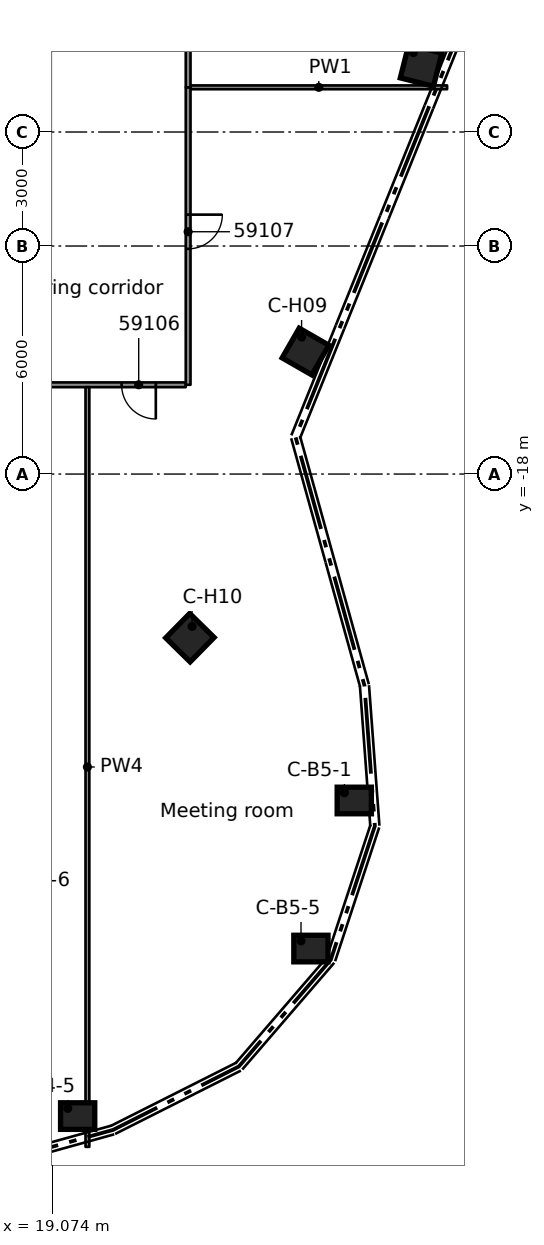
"""IFC4 building model, lengths in metres.
Left out: names, types, materials, properties, quantities, classifications, styles, units other than length and angle.
Written with IfcOpenShell. Run it as: python <this file> out.ifc"""

import sys

from ifc_helpers import new_model, si_unit, direction, frame, frame_2d, origin, origin_2d, place, context, subcontext, project, spatial, rectangle, extrude, element, fill, save


model = new_model("IFC4")
c1 = context("Model", 3, precision=1e-05, world=origin(), true_north=direction((0.0, 1.0)))
c2 = subcontext(c1, "Body", "Model", "MODEL_VIEW")
j1 = project(units=[si_unit("LENGTHUNIT", "METRE"), si_unit("PLANEANGLEUNIT", "RADIAN")], contexts=[c1])
p1 = place(None, origin())
s1 = spatial("IfcSite", under=j1, at=p1, CompositionType="ELEMENT")
p2 = place(p1, origin())
s2 = spatial("IfcBuilding", under=s1, at=p2, CompositionType="ELEMENT")
p3 = place(p2, frame((0.0, 0.0, 289.4)))
s3 = spatial("IfcBuildingStorey", under=s2, at=p3, CompositionType="ELEMENT", Elevation=289.4)
for number, where, z_axis, x_axis in (
    (1, (19.743, -34.893, 0.0), (0.0, 0.0, 1.0), (1.0, 0.0, 0.0)),
    (2, (27.022, -26.589, 0.0), (0.0, 0.0, 1.0), (1.0, 0.0, 0.0)),
    (3, (25.881, -30.485, 0.0), (0.0, 0.0, 1.0), (1.0, 0.0, 0.0)),
):
    element("IfcColumn", number, at=place(p3, frame(where, z_axis=z_axis, x_axis=x_axis)), inside=s3, PredefinedType="COLUMN", context=c2, shape_type="SweptSolid", body=[
        extrude(rectangle(XDim=0.9, YDim=0.7, at=origin_2d()), origin(), (0.0, 0.0, 1.0), 3.5),
    ])
for number, where, z_axis, x_axis in (
    (4, (28.78, -7.25, 0.0), (0.0, 0.0, 1.0), (0.97, -0.244, 0.0)),
    (5, (25.739, -14.777, 0.0), (0.0, 0.0, 1.0), (0.867, -0.498, 0.0)),
    (6, (22.697, -22.305, 0.0), (0.0, 0.0, 1.0), (0.713, -0.701, 0.0)),
):
    element("IfcColumn", number, at=place(p3, frame(where, z_axis=z_axis, x_axis=x_axis)), inside=s3, PredefinedType="COLUMN", context=c2, shape_type="SweptSolid", body=[
        extrude(rectangle(XDim=0.9, YDim=0.9, at=origin_2d()), origin(), (0.0, 0.0, 1.0), 3.5),
    ])
p4 = place(p3, frame((22.587, -15.651, 0.0), z_axis=(0.0, 0.0, 1.0), x_axis=(-1.0, 0.0, 0.0)))
e7 = element("IfcWall", 7, at=p4, inside=s3, PredefinedType="PARTITIONING", context=c2, shape_type="SweptSolid", body=[
    extrude(rectangle(XDim=10.996, YDim=0.125, at=frame_2d((5.498, 0.0))), origin(), (0.0, 0.0, 1.0), 3.15),
])
p5 = place(p4, frame((6.438, 0.0, 0.0)))
e8 = element("IfcOpeningElement", 8, at=p5, cuts=e7, PredefinedType="OPENING", context=c2, shape_type="SweptSolid", body=[
    extrude(rectangle(XDim=0.9, YDim=2.1, at=frame_2d((0.45, 1.05))), frame((0.0, 0.073, 0.0), z_axis=(0.0, -1.0, 0.0), x_axis=(1.0, 0.0, 0.0)), (0.0, 0.0, 1.0), 0.145),
])
p6 = place(p4, frame((0.788, 0.0, 0.0)))
e9 = element("IfcOpeningElement", 9, at=p6, cuts=e7, PredefinedType="OPENING", context=c2, shape_type="SweptSolid", body=[
    extrude(rectangle(XDim=0.9, YDim=2.1, at=frame_2d((0.45, 1.05))), frame((0.0, 0.073, 0.0), z_axis=(0.0, -1.0, 0.0), x_axis=(1.0, 0.0, 0.0)), (0.0, 0.0, 1.0), 0.145),
])
p7 = place(p3, frame((22.712, -7.824, 0.0), z_axis=(0.0, 0.0, 1.0), x_axis=(1.0, 0.0, 0.0)))
e10 = element("IfcWall", 10, at=p7, inside=s3, PredefinedType="PARTITIONING", context=c2, shape_type="SweptSolid", body=[
    extrude(rectangle(XDim=6.753, YDim=0.1, at=frame_2d((3.376, 0.0))), origin(), (0.0, 0.0, 1.0), 3.15),
])
p8 = place(p3, frame((22.65, -7.824, 0.0), z_axis=(0.0, 0.0, 1.0), x_axis=(0.0, -1.0, 0.0)))
e11 = element("IfcWall", 11, at=p8, inside=s3, PredefinedType="PARTITIONING", context=c2, shape_type="SweptSolid", body=[
    extrude(rectangle(XDim=7.827, YDim=0.125, at=frame_2d((3.914, 0.0))), origin(), (0.0, 0.0, 1.0), 3.15),
])
p9 = place(p8, frame((3.35, 0.0, 0.0)))
e12 = element("IfcOpeningElement", 12, at=p9, cuts=e11, PredefinedType="OPENING", context=c2, shape_type="SweptSolid", body=[
    extrude(rectangle(XDim=0.9, YDim=2.1, at=frame_2d((0.45, 1.05))), frame((0.0, 0.073, 0.0), z_axis=(0.0, -1.0, 0.0), x_axis=(1.0, 0.0, 0.0)), (0.0, 0.0, 1.0), 0.145),
])
p10 = place(p3, frame((22.65, 15.651, 0.0), z_axis=(0.0, 0.0, 1.0), x_axis=(0.0, -1.0, 0.0)))
e13 = element("IfcWall", 13, at=p10, inside=s3, PredefinedType="PARTITIONING", context=c2, shape_type="SweptSolid", body=[
    extrude(rectangle(XDim=23.475, YDim=0.125, at=frame_2d((11.737, 0.0))), origin(), (0.0, 0.0, 1.0), 3.15),
])
p11 = place(p10, frame((19.001, 0.0, 0.0)))
e14 = element("IfcOpeningElement", 14, at=p11, cuts=e13, PredefinedType="OPENING", context=c2, shape_type="SweptSolid", body=[
    extrude(rectangle(XDim=0.9, YDim=2.1, at=frame_2d((0.45, 1.05))), frame((0.0, 0.073, 0.0), z_axis=(0.0, -1.0, 0.0), x_axis=(1.0, 0.0, 0.0)), (0.0, 0.0, 1.0), 0.145),
])
p12 = place(p10, frame((11.177, 0.0, 0.0)))
e15 = element("IfcOpeningElement", 15, at=p12, cuts=e13, PredefinedType="OPENING", context=c2, shape_type="SweptSolid", body=[
    extrude(rectangle(XDim=0.9, YDim=2.1, at=frame_2d((0.45, 1.05))), frame((0.0, 0.073, 0.0), z_axis=(0.0, -1.0, 0.0), x_axis=(1.0, 0.0, 0.0)), (0.0, 0.0, 1.0), 0.145),
])
p13 = place(p3, frame((20.0, -35.703, 0.0), z_axis=(0.0, 0.0, 1.0), x_axis=(0.0, 1.0, 0.0)))
e16 = element("IfcWall", 16, at=p13, inside=s3, PredefinedType="PARTITIONING", context=c2, shape_type="SweptSolid", body=[
    extrude(rectangle(XDim=19.99, YDim=0.1, at=frame_2d((9.995, 0.0))), origin(), (0.0, 0.0, 1.0), 2.495),
])
p14 = place(p6, origin())
e17 = element("IfcDoor", 17, at=p14, inside=s3, OperationType="SINGLE_SWING_LEFT", PredefinedType="DOOR", context=c2, shape_type="SweptSolid", body=[
    extrude(rectangle(XDim=0.9, YDim=2.1, at=frame_2d((0.45, 1.05))), frame((0.0, 0.025, 0.0), z_axis=(0.0, -1.0, 0.0), x_axis=(1.0, 0.0, 0.0)), (0.0, 0.0, 1.0), 0.05),
])
fill(e9, e17)
p15 = place(p9, origin())
e18 = element("IfcDoor", 18, at=p15, inside=s3, OperationType="SINGLE_SWING_LEFT", PredefinedType="DOOR", context=c2, shape_type="SweptSolid", body=[
    extrude(rectangle(XDim=0.9, YDim=2.1, at=frame_2d((0.45, 1.05))), frame((0.0, 0.025, 0.0), z_axis=(0.0, -1.0, 0.0), x_axis=(1.0, 0.0, 0.0)), (0.0, 0.0, 1.0), 0.05),
])
fill(e12, e18)
save(model, sys.argv[1])
